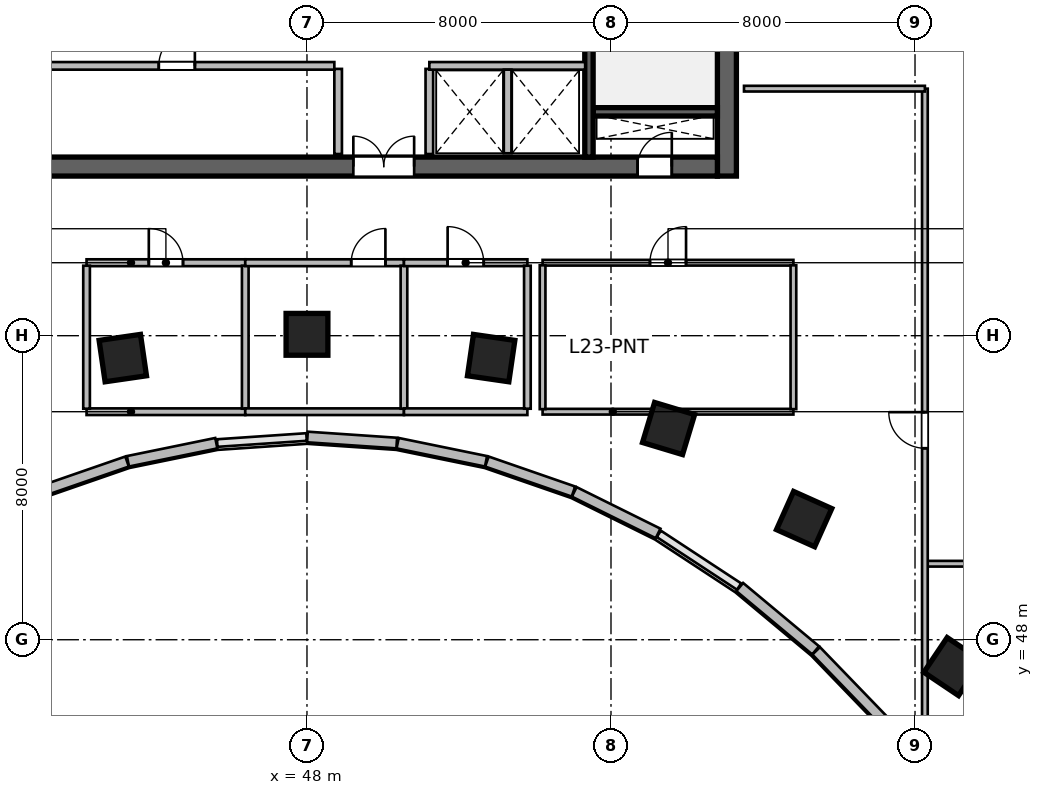
"""IFC4 building model, lengths in metres.
Left out: names, types, materials, properties, quantities, classifications, styles, units other than length and angle.
Written with IfcOpenShell. Run it as: python <this file> out.ifc"""

import sys

from ifc_helpers import new_model, si_unit, direction, frame, frame_2d, origin, origin_2d, place, context, subcontext, project, spatial, rectangle, extrude, source, transform, mapped, element, fill, save


model = new_model("IFC4")
c1 = context("Model", 3, precision=1e-05, world=origin(), true_north=direction((0.0, 1.0)))
c2 = subcontext(c1, "Body", "Model", "MODEL_VIEW")
j1 = project(units=[si_unit("LENGTHUNIT", "METRE"), si_unit("PLANEANGLEUNIT", "RADIAN")], contexts=[c1])
p1 = place(None, origin())
s1 = spatial("IfcSite", under=j1, at=p1, CompositionType="ELEMENT")
p2 = place(p1, origin())
s2 = spatial("IfcBuilding", under=s1, at=p2, CompositionType="ELEMENT")
p3 = place(p2, frame((0.0, 0.0, 99.9)))
s3 = spatial("IfcBuildingStorey", under=s2, at=p3, CompositionType="ELEMENT", Elevation=99.9)
m1 = source(origin(), c2, "Body", "SweptSolid", [
    extrude(rectangle(XDim=12.0, YDim=0.5, at=frame_2d((6.0, 0.0))), origin(), (0.0, 0.0, 1.0), 3.9),
])
p4 = place(p3, frame((59.05, 60.2, 0.0), z_axis=(0.0, 0.0, 1.0), x_axis=(0.0, 1.0, 0.0)))
e1 = element("IfcWall", 1, at=p4, inside=s3, PredefinedType="SHEAR", context=c2, shape_type="MappedRepresentation", body=[
    mapped(m1, transform((0.0, 0.0, 0.0), scale=1.0)),
])
m2 = source(origin(), c2, "Body", "SweptSolid", [
    extrude(rectangle(XDim=21.6, YDim=0.5, at=frame_2d((10.8, 0.0))), origin(), (0.0, 0.0, 1.0), 3.9),
])
p5 = place(p3, frame((37.2, 60.45, 0.0), z_axis=(0.0, 0.0, 1.0), x_axis=(1.0, 0.0, 0.0)))
e2 = element("IfcWall", 2, at=p5, inside=s3, PredefinedType="SHEAR", context=c2, shape_type="MappedRepresentation", body=[
    mapped(m2, transform((0.0, 0.0, 0.0), scale=1.0)),
])
p6 = place(p5, frame((1.1, 0.0, 0.0)))
e3 = element("IfcOpeningElement", 3, at=p6, cuts=e2, PredefinedType="OPENING", context=c2, shape_type="SweptSolid", body=[
    extrude(rectangle(XDim=1.15, YDim=2.15, at=frame_2d((0.575, 1.075))), frame((0.0, 0.26, 0.0), z_axis=(0.0, -1.0, 0.0), x_axis=(1.0, 0.0, 0.0)), (0.0, 0.0, 1.0), 0.52),
])
p7 = place(p5, frame((19.5, 0.0, 0.0)))
e4 = element("IfcOpeningElement", 4, at=p7, cuts=e2, PredefinedType="OPENING", context=c2, shape_type="SweptSolid", body=[
    extrude(rectangle(XDim=0.9, YDim=2.1, at=frame_2d((0.45, 1.05))), frame((0.0, 0.26, 0.0), z_axis=(0.0, -1.0, 0.0), x_axis=(1.0, 0.0, 0.0)), (0.0, 0.0, 1.0), 0.52),
])
p8 = place(p5, frame((12.02, 0.0, 0.0)))
e5 = element("IfcOpeningElement", 5, at=p8, cuts=e2, PredefinedType="OPENING", context=c2, shape_type="SweptSolid", body=[
    extrude(rectangle(XDim=1.6, YDim=2.15, at=frame_2d((0.8, 1.075))), frame((0.0, 0.26, 0.0), z_axis=(0.0, -1.0, 0.0), x_axis=(1.0, 0.0, 0.0)), (0.0, 0.0, 1.0), 0.52),
])
m3 = source(origin(), c2, "Body", "SweptSolid", [
    extrude(rectangle(XDim=3.27, YDim=0.22, at=frame_2d((1.635, 0.0))), origin(), (0.0, 0.0, 1.0), 3.9),
])
p9 = place(p3, frame((55.53, 61.89, 0.0), z_axis=(0.0, 0.0, 1.0), x_axis=(1.0, 0.0, 0.0)))
e6 = element("IfcWall", 6, at=p9, inside=s3, PredefinedType="SHEAR", context=c2, shape_type="MappedRepresentation", body=[
    mapped(m3, transform((0.0, 0.0, 0.0), scale=1.0)),
])
m4 = source(origin(), c2, "Body", "SweptSolid", [
    extrude(rectangle(XDim=11.0, YDim=0.22, at=frame_2d((5.5, 0.0))), origin(), (0.0, 0.0, 1.0), 3.9),
])
p10 = place(p3, frame((55.42, 60.7, 0.0), z_axis=(0.0, 0.0, 1.0), x_axis=(0.0, 1.0, 0.0)))
e7 = element("IfcWall", 7, at=p10, inside=s3, PredefinedType="SHEAR", context=c2, shape_type="MappedRepresentation", body=[
    mapped(m4, transform((0.0, 0.0, 0.0), scale=1.0)),
])
p11 = place(p10, frame((9.545, 0.0, 0.0)))
e8 = element("IfcOpeningElement", 8, at=p11, cuts=e7, PredefinedType="OPENING", context=c2, shape_type="SweptSolid", body=[
    extrude(rectangle(XDim=1.15, YDim=2.15, at=frame_2d((0.575, 1.075))), frame((0.0, 0.12, 0.0), z_axis=(0.0, -1.0, 0.0), x_axis=(1.0, 0.0, 0.0)), (0.0, 0.0, 1.0), 0.24),
])
m5 = source(origin(), c2, "Body", "SweptSolid", [
    extrude(rectangle(XDim=1.1, YDim=1.1, at=origin_2d()), origin(), (0.0, 0.0, 1.0), 3.9),
])
for number, where, z_axis, x_axis in (
    (9, (43.154, 55.411, 0.0), (0.0, 0.0, 1.0), (-0.143, 0.99, 0.0)),
    (10, (48.0, 56.036, 0.0), (0.0, 0.0, 1.0), (0.0, 1.0, 0.0)),
    (11, (52.846, 55.411, 0.0), (0.0, 0.0, 1.0), (0.143, 0.99, 0.0)),
    (12, (57.515, 53.558, 0.0), (0.0, 0.0, 1.0), (0.289, 0.957, 0.0)),
    (13, (61.082, 51.175, 0.0), (0.0, 0.0, 1.0), (0.409, 0.912, 0.0)),
    (14, (64.996, 47.294, 0.0), (0.0, 0.0, 1.0), (0.558, 0.83, 0.0)),
):
    element("IfcColumn", number, at=place(p3, frame(where, z_axis=z_axis, x_axis=x_axis)), inside=s3, PredefinedType="COLUMN", context=c2, shape_type="MappedRepresentation", body=[
        mapped(m5, transform((0.0, 0.0, 0.0), scale=1.0)),
    ])
m6 = source(origin(), c2, "Body", "SweptSolid", [
    extrude(rectangle(XDim=2.68, YDim=0.28, at=frame_2d((1.34, 0.0))), origin(), (0.0, 0.0, 1.0), 3.65),
])
p12 = place(p3, frame((63.26, 45.78, 0.0), z_axis=(0.0, 0.0, 1.0), x_axis=(-0.694561996568, 0.719432855049, 0.0)))
e15 = element("IfcWall", 15, at=p12, inside=s3, PredefinedType="SOLIDWALL", context=c2, shape_type="MappedRepresentation", body=[
    mapped(m6, transform((0.0, 0.0, 0.0), scale=1.0)),
])
m7 = source(origin(), c2, "Body", "SweptSolid", [
    extrude(rectangle(XDim=2.601, YDim=0.28, at=frame_2d((1.3, 0.0))), origin(), (0.0, 0.0, 1.0), 3.65),
])
p13 = place(p3, frame((61.385, 47.721, 0.0), z_axis=(0.0, 0.0, 1.0), x_axis=(-0.76796730295, 0.640489048775, 0.0)))
e16 = element("IfcWall", 16, at=p13, inside=s3, PredefinedType="SOLIDWALL", context=c2, shape_type="MappedRepresentation", body=[
    mapped(m7, transform((0.0, 0.0, 0.0), scale=1.0)),
])
m8 = source(origin(), c2, "Body", "SweptSolid", [
    extrude(rectangle(XDim=2.462, YDim=0.28, at=frame_2d((1.231, 0.0))), origin(), (0.0, 0.0, 1.0), 3.65),
])
p14 = place(p3, frame((57.239, 50.797, 0.0), z_axis=(0.0, 0.0, 1.0), x_axis=(-0.8959882207, 0.444077817917, 0.0)))
e17 = element("IfcWall", 17, at=p14, inside=s3, PredefinedType="SOLIDWALL", context=c2, shape_type="MappedRepresentation", body=[
    mapped(m8, transform((0.0, 0.0, 0.0), scale=1.0)),
])
m9 = source(origin(), c2, "Body", "SweptSolid", [
    extrude(rectangle(XDim=2.411, YDim=0.28, at=frame_2d((1.205, 0.0))), origin(), (0.0, 0.0, 1.0), 3.65),
])
p15 = place(p3, frame((55.012, 51.899, 0.0), z_axis=(0.0, 0.0, 1.0), x_axis=(-0.944880068161, 0.327416640982, 0.0)))
e18 = element("IfcWall", 18, at=p15, inside=s3, PredefinedType="SOLIDWALL", context=c2, shape_type="MappedRepresentation", body=[
    mapped(m9, transform((0.0, 0.0, 0.0), scale=1.0)),
])
m10 = source(origin(), c2, "Body", "SweptSolid", [
    extrude(rectangle(XDim=2.374, YDim=0.28, at=frame_2d((1.187, 0.0))), origin(), (0.0, 0.0, 1.0), 3.65),
])
p16 = place(p3, frame((52.711, 52.695, 0.0), z_axis=(0.0, 0.0, 1.0), x_axis=(-0.979619827472, 0.200860632341, 0.0)))
e19 = element("IfcWall", 19, at=p16, inside=s3, PredefinedType="SOLIDWALL", context=c2, shape_type="MappedRepresentation", body=[
    mapped(m10, transform((0.0, 0.0, 0.0), scale=1.0)),
])
m11 = source(origin(), c2, "Body", "SweptSolid", [
    extrude(rectangle(XDim=2.355, YDim=0.28, at=frame_2d((1.177, 0.0))), origin(), (0.0, 0.0, 1.0), 3.65),
])
p17 = place(p3, frame((50.362, 53.175, 0.0), z_axis=(0.0, 0.0, 1.0), x_axis=(-0.997699017577, 0.067798748701, 0.0)))
e20 = element("IfcWall", 20, at=p17, inside=s3, PredefinedType="SOLIDWALL", context=c2, shape_type="MappedRepresentation", body=[
    mapped(m11, transform((0.0, 0.0, 0.0), scale=1.0)),
])
p18 = place(p3, frame((45.614, 53.172, 0.0), z_axis=(0.0, 0.0, 1.0), x_axis=(-0.979619827472, -0.200860632341, 0.0)))
e21 = element("IfcWall", 21, at=p18, inside=s3, PredefinedType="SOLIDWALL", context=c2, shape_type="MappedRepresentation", body=[
    mapped(m10, transform((0.0, 0.0, 0.0), scale=1.0)),
])
p19 = place(p3, frame((43.266, 52.689, 0.0), z_axis=(0.0, 0.0, 1.0), x_axis=(-0.944880068161, -0.327416640982, 0.0)))
e22 = element("IfcWall", 22, at=p19, inside=s3, PredefinedType="SOLIDWALL", context=c2, shape_type="MappedRepresentation", body=[
    mapped(m9, transform((0.0, 0.0, 0.0), scale=1.0)),
])
m12 = source(origin(), c2, "Body", "SweptSolid", [
    extrude(rectangle(XDim=2.24, YDim=0.2, at=frame_2d((1.12, 0.0))), origin(), (0.0, 0.0, 1.0), 3.65),
])
for number, where, z_axis, x_axis in (
    (23, (48.82, 60.78, 0.0), (0.0, 0.0, 1.0), (0.0, 1.0, 0.0)),
    (24, (51.22, 60.78, 0.0), (0.0, 0.0, 1.0), (0.0, 1.0, 0.0)),
):
    element("IfcWall", number, at=place(p3, frame(where, z_axis=z_axis, x_axis=x_axis)), inside=s3, PredefinedType="SOLIDWALL", context=c2, shape_type="MappedRepresentation", body=[
        mapped(m12, transform((0.0, 0.0, 0.0), scale=1.0)),
    ])
m13 = source(origin(), c2, "Body", "SweptSolid", [
    extrude(rectangle(XDim=8.02, YDim=0.2, at=frame_2d((4.01, 0.0))), origin(), (0.0, 0.0, 1.0), 3.65),
])
p20 = place(p3, frame((40.7, 63.1, 0.0), z_axis=(0.0, 0.0, 1.0), x_axis=(1.0, 0.0, 0.0)))
e25 = element("IfcWall", 25, at=p20, inside=s3, PredefinedType="SOLIDWALL", context=c2, shape_type="MappedRepresentation", body=[
    mapped(m13, transform((0.0, 0.0, 0.0), scale=1.0)),
])
p21 = place(p20, frame((3.4, 0.0, 0.0)))
e26 = element("IfcOpeningElement", 26, at=p21, cuts=e25, PredefinedType="OPENING", context=c2, shape_type="SweptSolid", body=[
    extrude(rectangle(XDim=0.95, YDim=2.15, at=frame_2d((0.475, 1.075))), frame((0.0, 0.11, 0.0), z_axis=(0.0, -1.0, 0.0), x_axis=(1.0, 0.0, 0.0)), (0.0, 0.0, 1.0), 0.22),
])
m14 = source(origin(), c2, "Body", "SweptSolid", [
    extrude(rectangle(XDim=4.1, YDim=0.2, at=frame_2d((2.05, 0.0))), origin(), (0.0, 0.0, 1.0), 3.65),
])
p22 = place(p3, frame((51.22, 63.1, 0.0), z_axis=(0.0, 0.0, 1.0), x_axis=(1.0, 0.0, 0.0)))
e27 = element("IfcWall", 27, at=p22, inside=s3, PredefinedType="SOLIDWALL", context=c2, shape_type="MappedRepresentation", body=[
    mapped(m14, transform((0.0, 0.0, 0.0), scale=1.0)),
])
m15 = source(origin(), c2, "Body", "SweptSolid", [
    extrude(rectangle(XDim=2.2, YDim=0.2, at=frame_2d((1.1, 0.0))), origin(), (0.0, 0.0, 1.0), 3.65),
])
p23 = place(p3, frame((53.28, 60.8, 0.0), z_axis=(0.0, 0.0, 1.0), x_axis=(0.0, 1.0, 0.0)))
e28 = element("IfcWall", 28, at=p23, inside=s3, PredefinedType="SOLIDWALL", context=c2, shape_type="MappedRepresentation", body=[
    mapped(m15, transform((0.0, 0.0, 0.0), scale=1.0)),
])
m16 = source(origin(), c2, "Body", "SweptSolid", [
    extrude(rectangle(XDim=4.176, YDim=0.175, at=frame_2d((2.088, 0.0))), origin(), (0.0, 0.0, 1.0), 3.65),
])
p24 = place(p3, frame((42.2, 54.0, 0.0), z_axis=(0.0, 0.0, 1.0), x_axis=(1.0, 0.0, 0.0)))
e29 = element("IfcWall", 29, at=p24, inside=s3, PredefinedType="PARTITIONING", context=c2, shape_type="MappedRepresentation", body=[
    mapped(m16, transform((0.0, 0.0, 0.0), scale=1.0)),
])
m17 = source(origin(), c2, "Body", "SweptSolid", [
    extrude(rectangle(XDim=4.176, YDim=0.18, at=frame_2d((2.088, 0.0))), origin(), (0.0, 0.0, 1.0), 3.65),
])
p25 = place(p3, frame((42.2, 57.92, 0.0), z_axis=(0.0, 0.0, 1.0), x_axis=(1.0, 0.0, 0.0)))
e30 = element("IfcWall", 30, at=p25, inside=s3, PredefinedType="PLUMBINGWALL", context=c2, shape_type="MappedRepresentation", body=[
    mapped(m17, transform((0.0, 0.0, 0.0), scale=1.0)),
])
p26 = place(p25, frame((1.638, 0.0, 0.0)))
e31 = element("IfcOpeningElement", 31, at=p26, cuts=e30, PredefinedType="OPENING", context=c2, shape_type="SweptSolid", body=[
    extrude(rectangle(XDim=0.9, YDim=2.08, at=frame_2d((0.45, 1.04))), frame((0.0, 0.1, 0.0), z_axis=(0.0, -1.0, 0.0), x_axis=(1.0, 0.0, 0.0)), (0.0, 0.0, 1.0), 0.2),
])
m18 = source(origin(), c2, "Body", "SweptSolid", [
    extrude(rectangle(XDim=3.763, YDim=0.175, at=frame_2d((1.881, 0.0))), origin(), (0.0, 0.0, 1.0), 3.65),
])
for number, where, z_axis, x_axis in (
    (32, (42.2, 54.079, 0.0), (0.0, 0.0, 1.0), (0.0, 1.0, 0.0)),
    (33, (46.376, 54.079, 0.0), (0.0, 0.0, 1.0), (0.0, 1.0, 0.0)),
):
    element("IfcWall", number, at=place(p3, frame(where, z_axis=z_axis, x_axis=x_axis)), inside=s3, PredefinedType="PARTITIONING", context=c2, shape_type="MappedRepresentation", body=[
        mapped(m18, transform((0.0, 0.0, 0.0), scale=1.0)),
    ])
p27 = place(p3, frame((46.376, 54.0, 0.0), z_axis=(0.0, 0.0, 1.0), x_axis=(1.0, 0.0, 0.0)))
e34 = element("IfcWall", 34, at=p27, inside=s3, PredefinedType="PARTITIONING", context=c2, shape_type="MappedRepresentation", body=[
    mapped(m16, transform((0.0, 0.0, 0.0), scale=1.0)),
])
p28 = place(p3, frame((46.376, 57.92, 0.0), z_axis=(0.0, 0.0, 1.0), x_axis=(1.0, 0.0, 0.0)))
e35 = element("IfcWall", 35, at=p28, inside=s3, PredefinedType="PLUMBINGWALL", context=c2, shape_type="MappedRepresentation", body=[
    mapped(m17, transform((0.0, 0.0, 0.0), scale=1.0)),
])
p29 = place(p28, frame((2.788, 0.0, 0.0)))
e36 = element("IfcOpeningElement", 36, at=p29, cuts=e35, PredefinedType="OPENING", context=c2, shape_type="SweptSolid", body=[
    extrude(rectangle(XDim=0.9, YDim=2.08, at=frame_2d((0.45, 1.04))), frame((0.0, 0.1, 0.0), z_axis=(0.0, -1.0, 0.0), x_axis=(1.0, 0.0, 0.0)), (0.0, 0.0, 1.0), 0.2),
])
p30 = place(p3, frame((50.552, 54.079, 0.0), z_axis=(0.0, 0.0, 1.0), x_axis=(0.0, 1.0, 0.0)))
e37 = element("IfcWall", 37, at=p30, inside=s3, PredefinedType="PARTITIONING", context=c2, shape_type="MappedRepresentation", body=[
    mapped(m18, transform((0.0, 0.0, 0.0), scale=1.0)),
])
m19 = source(origin(), c2, "Body", "SweptSolid", [
    extrude(rectangle(XDim=3.248, YDim=0.175, at=frame_2d((1.624, 0.0))), origin(), (0.0, 0.0, 1.0), 3.65),
])
p31 = place(p3, frame((50.552, 54.0, 0.0), z_axis=(0.0, 0.0, 1.0), x_axis=(1.0, 0.0, 0.0)))
e38 = element("IfcWall", 38, at=p31, inside=s3, PredefinedType="PARTITIONING", context=c2, shape_type="MappedRepresentation", body=[
    mapped(m19, transform((0.0, 0.0, 0.0), scale=1.0)),
])
m20 = source(origin(), c2, "Body", "SweptSolid", [
    extrude(rectangle(XDim=3.248, YDim=0.18, at=frame_2d((1.624, 0.0))), origin(), (0.0, 0.0, 1.0), 3.65),
])
p32 = place(p3, frame((50.552, 57.92, 0.0), z_axis=(0.0, 0.0, 1.0), x_axis=(1.0, 0.0, 0.0)))
e39 = element("IfcWall", 39, at=p32, inside=s3, PredefinedType="PLUMBINGWALL", context=c2, shape_type="MappedRepresentation", body=[
    mapped(m20, transform((0.0, 0.0, 0.0), scale=1.0)),
])
p33 = place(p32, frame((1.149, 0.0, 0.0)))
e40 = element("IfcOpeningElement", 40, at=p33, cuts=e39, PredefinedType="OPENING", context=c2, shape_type="SweptSolid", body=[
    extrude(rectangle(XDim=0.95, YDim=2.12, at=frame_2d((0.475, 1.06))), frame((0.0, 0.1, 0.0), z_axis=(0.0, -1.0, 0.0), x_axis=(1.0, 0.0, 0.0)), (0.0, 0.0, 1.0), 0.2),
])
p34 = place(p3, frame((53.8, 54.079, 0.0), z_axis=(0.0, 0.0, 1.0), x_axis=(0.0, 1.0, 0.0)))
e41 = element("IfcWall", 41, at=p34, inside=s3, PredefinedType="PARTITIONING", context=c2, shape_type="MappedRepresentation", body=[
    mapped(m18, transform((0.0, 0.0, 0.0), scale=1.0)),
])
m21 = source(origin(), c2, "Body", "SweptSolid", [
    extrude(rectangle(XDim=6.6, YDim=0.15, at=frame_2d((3.3, 0.0))), origin(), (0.0, 0.0, 1.0), 3.095),
])
p35 = place(p3, frame((54.2, 54.0, 0.0), z_axis=(0.0, 0.0, 1.0), x_axis=(1.0, 0.0, 0.0)))
e42 = element("IfcWall", 42, at=p35, inside=s3, PredefinedType="PARTITIONING", context=c2, shape_type="MappedRepresentation", body=[
    mapped(m21, transform((0.0, 0.0, 0.0), scale=1.0)),
])
m22 = source(origin(), c2, "Body", "SweptSolid", [
    extrude(rectangle(XDim=6.6, YDim=0.15, at=frame_2d((3.3, 0.0))), origin(), (0.0, 0.0, 1.0), 3.65),
])
p36 = place(p3, frame((54.2, 57.92, 0.0), z_axis=(0.0, 0.0, 1.0), x_axis=(1.0, 0.0, 0.0)))
e43 = element("IfcWall", 43, at=p36, inside=s3, PredefinedType="PARTITIONING", context=c2, shape_type="MappedRepresentation", body=[
    mapped(m22, transform((0.0, 0.0, 0.0), scale=1.0)),
])
p37 = place(p36, frame((2.825, 0.0, 0.0)))
e44 = element("IfcOpeningElement", 44, at=p37, cuts=e43, PredefinedType="OPENING", context=c2, shape_type="SweptSolid", body=[
    extrude(rectangle(XDim=0.95, YDim=2.1, at=frame_2d((0.475, 1.05))), frame((0.0, 0.085, 0.0), z_axis=(0.0, -1.0, 0.0), x_axis=(1.0, 0.0, 0.0)), (0.0, 0.0, 1.0), 0.17),
])
m23 = source(origin(), c2, "Body", "SweptSolid", [
    extrude(rectangle(XDim=3.785, YDim=0.15, at=frame_2d((1.893, 0.0))), origin(), (0.0, 0.0, 1.0), 3.65),
])
for number, where, z_axis, x_axis in (
    (45, (54.2, 54.067, 0.0), (0.0, 0.0, 1.0), (0.0, 1.0, 0.0)),
    (46, (60.8, 54.067, 0.0), (0.0, 0.0, 1.0), (0.0, 1.0, 0.0)),
):
    element("IfcWall", number, at=place(p3, frame(where, z_axis=z_axis, x_axis=x_axis)), inside=s3, PredefinedType="PARTITIONING", context=c2, shape_type="MappedRepresentation", body=[
        mapped(m23, transform((0.0, 0.0, 0.0), scale=1.0)),
    ])
m24 = source(origin(), c2, "Body", "SweptSolid", [
    extrude(rectangle(XDim=2.5, YDim=0.15, at=frame_2d((1.25, 0.0))), origin(), (0.0, 0.0, 1.0), 3.65),
])
p38 = place(p3, frame((64.3, 50.0, 0.0), z_axis=(0.0, 0.0, 1.0), x_axis=(1.0, 0.0, 0.0)))
e47 = element("IfcWall", 47, at=p38, inside=s3, PredefinedType="PARTITIONING", context=c2, shape_type="MappedRepresentation", body=[
    mapped(m24, transform((0.0, 0.0, 0.0), scale=1.0)),
])
m25 = source(origin(), c2, "Body", "SweptSolid", [
    extrude(rectangle(XDim=17.974, YDim=0.15, at=frame_2d((8.987, 0.0))), origin(), (0.0, 0.0, 1.0), 2.942),
])
p39 = place(p3, frame((64.26, 44.526, 0.0), z_axis=(0.0, 0.0, 1.0), x_axis=(0.0, 1.0, 0.0)))
e48 = element("IfcWall", 48, at=p39, inside=s3, PredefinedType="PARTITIONING", context=c2, shape_type="MappedRepresentation", body=[
    mapped(m25, transform((0.0, 0.0, 0.0), scale=1.0)),
])
p40 = place(p39, frame((8.512, 0.0, 0.0)))
e49 = element("IfcOpeningElement", 49, at=p40, cuts=e48, PredefinedType="OPENING", context=c2, shape_type="SweptSolid", body=[
    extrude(rectangle(XDim=0.95, YDim=2.1, at=frame_2d((0.475, 1.05))), frame((0.0, 0.085, 0.0), z_axis=(0.0, -1.0, 0.0), x_axis=(1.0, 0.0, 0.0)), (0.0, 0.0, 1.0), 0.17),
])
m26 = source(origin(), c2, "Body", "SweptSolid", [
    extrude(rectangle(XDim=4.76, YDim=0.15, at=frame_2d((2.38, 0.0))), origin(), (0.0, 0.0, 1.0), 3.65),
])
p41 = place(p3, frame((59.5, 62.5, 0.0), z_axis=(0.0, 0.0, 1.0), x_axis=(1.0, 0.0, 0.0)))
e50 = element("IfcWall", 50, at=p41, inside=s3, PredefinedType="PARTITIONING", context=c2, shape_type="MappedRepresentation", body=[
    mapped(m26, transform((0.0, 0.0, 0.0), scale=1.0)),
])
m27 = source(origin(), c2, "Body", "SweptSolid", [
    extrude(rectangle(XDim=0.9, YDim=2.1, at=frame_2d((0.45, 1.05))), frame((0.0, 0.025, 0.0), z_axis=(0.0, -1.0, 0.0), x_axis=(1.0, 0.0, 0.0)), (0.0, 0.0, 1.0), 0.05),
])
p42 = place(p7, origin())
e51 = element("IfcDoor", 51, at=p42, inside=s3, OperationType="SINGLE_SWING_RIGHT", PredefinedType="DOOR", context=c2, shape_type="MappedRepresentation", body=[
    mapped(m27, transform((0.0, 0.0, 0.0), scale=1.0)),
])
fill(e4, e51)
m28 = source(origin(), c2, "Body", "SweptSolid", [
    extrude(rectangle(XDim=1.6, YDim=2.15, at=frame_2d((0.8, 1.075))), frame((0.0, 0.025, 0.0), z_axis=(0.0, -1.0, 0.0), x_axis=(1.0, 0.0, 0.0)), (0.0, 0.0, 1.0), 0.05),
])
p43 = place(p8, origin())
e52 = element("IfcDoor", 52, at=p43, inside=s3, OperationType="DOUBLE_DOOR_SINGLE_SWING", PredefinedType="DOOR", context=c2, shape_type="MappedRepresentation", body=[
    mapped(m28, transform((0.0, 0.0, 0.0), scale=1.0)),
])
fill(e5, e52)
m29 = source(origin(), c2, "Body", "SweptSolid", [
    extrude(rectangle(XDim=0.95, YDim=2.15, at=frame_2d((0.475, 1.075))), frame((0.0, 0.025, 0.0), z_axis=(0.0, -1.0, 0.0), x_axis=(1.0, 0.0, 0.0)), (0.0, 0.0, 1.0), 0.05),
])
p44 = place(p21, origin())
e53 = element("IfcDoor", 53, at=p44, inside=s3, OperationType="SINGLE_SWING_RIGHT", PredefinedType="DOOR", context=c2, shape_type="MappedRepresentation", body=[
    mapped(m29, transform((0.0, 0.0, 0.0), scale=1.0)),
])
fill(e26, e53)
m30 = source(origin(), c2, "Body", "SweptSolid", [
    extrude(rectangle(XDim=0.9, YDim=2.08, at=frame_2d((0.45, 1.04))), frame((0.0, 0.025, 0.0), z_axis=(0.0, -1.0, 0.0), x_axis=(1.0, 0.0, 0.0)), (0.0, 0.0, 1.0), 0.05),
])
p45 = place(p26, origin())
e54 = element("IfcDoor", 54, at=p45, inside=s3, OperationType="SINGLE_SWING_LEFT", PredefinedType="DOOR", context=c2, shape_type="MappedRepresentation", body=[
    mapped(m30, transform((0.0, 0.0, 0.0), scale=1.0)),
])
fill(e31, e54)
p46 = place(p29, origin())
e55 = element("IfcDoor", 55, at=p46, inside=s3, OperationType="SINGLE_SWING_RIGHT", PredefinedType="DOOR", context=c2, shape_type="MappedRepresentation", body=[
    mapped(m30, transform((0.0, 0.0, 0.0), scale=1.0)),
])
fill(e36, e55)
m31 = source(origin(), c2, "Body", "SweptSolid", [
    extrude(rectangle(XDim=0.95, YDim=2.12, at=frame_2d((0.475, 1.06))), frame((0.0, 0.025, 0.0), z_axis=(0.0, -1.0, 0.0), x_axis=(1.0, 0.0, 0.0)), (0.0, 0.0, 1.0), 0.05),
])
p47 = place(p33, origin())
e56 = element("IfcDoor", 56, at=p47, inside=s3, OperationType="SINGLE_SWING_LEFT", PredefinedType="DOOR", context=c2, shape_type="MappedRepresentation", body=[
    mapped(m31, transform((0.0, 0.0, 0.0), scale=1.0)),
])
fill(e40, e56)
m32 = source(origin(), c2, "Body", "SweptSolid", [
    extrude(rectangle(XDim=0.95, YDim=2.1, at=frame_2d((0.475, 1.05))), frame((0.0, 0.025, 0.0), z_axis=(0.0, -1.0, 0.0), x_axis=(1.0, 0.0, 0.0)), (0.0, 0.0, 1.0), 0.05),
])
p48 = place(p37, origin())
e57 = element("IfcDoor", 57, at=p48, inside=s3, OperationType="SINGLE_SWING_RIGHT", PredefinedType="DOOR", context=c2, shape_type="MappedRepresentation", body=[
    mapped(m32, transform((0.0, 0.0, 0.0), scale=1.0)),
])
fill(e44, e57)
p49 = place(p40, origin())
e58 = element("IfcDoor", 58, at=p49, inside=s3, OperationType="SINGLE_SWING_RIGHT", PredefinedType="DOOR", context=c2, shape_type="MappedRepresentation", body=[
    mapped(m32, transform((0.0, 0.0, 0.0), scale=1.0)),
])
fill(e49, e58)
save(model, sys.argv[1])
